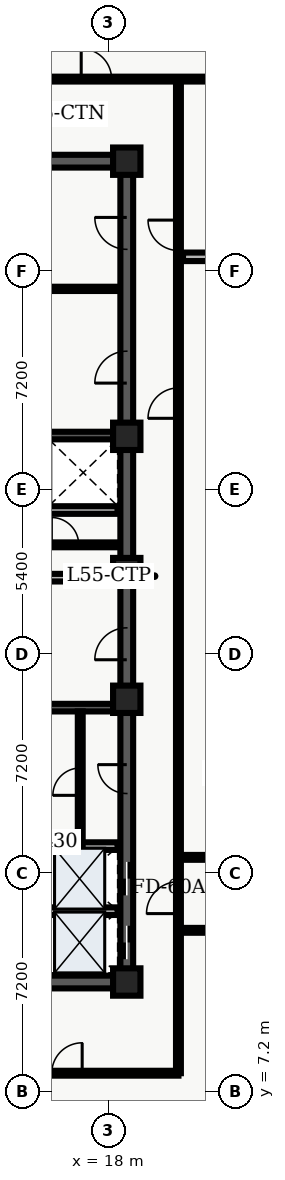
"""IFC4 building model, lengths in metres.
Left out: names, types, materials, properties, quantities, classifications, styles, units other than length and angle.
Written with IfcOpenShell. Run it as: python <this file> out.ifc"""

import sys

from ifc_helpers import new_model, entity, si_unit, converted_unit, direction, frame, origin_with_axes, origin_2d_with_axis, place, context, subcontext, project, spatial, polyline, rectangle, outline, extrude, element, fill, save


model = new_model("IFC4")
c1 = context("Model", 3, precision=1e-05, world=origin_with_axes(), true_north=direction((0.0, 1.0)))
c2 = subcontext(c1, "Body", "Model", "MODEL_VIEW")
j1 = project(units=[si_unit("LENGTHUNIT", "METRE"), converted_unit("PLANEANGLEUNIT", "DEGREE", entity("IfcPlaneAngleMeasure", 0.017), si_unit("PLANEANGLEUNIT", "RADIAN"), dimensions=[0, 0, 0, 0, 0, 0, 0])], contexts=[c1])
p1 = place(None, origin_with_axes())
s1 = spatial("IfcSite", under=j1, at=p1, CompositionType="ELEMENT")
p2 = place(p1, origin_with_axes())
s2 = spatial("IfcBuilding", under=s1, at=p2, CompositionType="ELEMENT")
p3 = place(p2, frame((0.0, 0.0, 224.7), z_axis=(0.0, 0.0, 1.0), x_axis=(1.0, 0.0, 0.0)))
s3 = spatial("IfcBuildingStorey", under=s2, at=p3, CompositionType="ELEMENT", Elevation=224.7)
p4 = place(p3, frame((11.4, 10.8, 0.0), z_axis=(0.0, 0.0, 1.0), x_axis=(1.0, 0.0, 0.0)))
e1 = element("IfcWall", 1, at=p4, inside=s3, PredefinedType="SHEAR", context=c2, shape_type="SweptSolid", body=[
    extrude(outline(polyline([(0.0, -0.21), (7.2, -0.21), (7.2, 0.21), (0.0, 0.21), (0.0, -0.21)])), origin_with_axes(), (0.0, 0.0, 1.0), 3.66),
])
p5 = place(p4, frame((2.625, 0.0, 0.0), z_axis=(0.0, 0.0, 1.0), x_axis=(1.0, 0.0, 0.0)))
e2 = element("IfcOpeningElement", 2, at=p5, cuts=e1, PredefinedType="OPENING", context=c2, shape_type="SweptSolid", body=[
    extrude(rectangle(XDim=1.05, YDim=0.44, at=origin_2d_with_axis()), origin_with_axes(), (0.0, 0.0, 1.0), 2.15),
])
p6 = place(p3, frame((11.4, 37.8, 0.0), z_axis=(0.0, 0.0, 1.0), x_axis=(1.0, 0.0, 0.0)))
e3 = element("IfcWall", 3, at=p6, inside=s3, PredefinedType="SHEAR", context=c2, shape_type="SweptSolid", body=[
    extrude(outline(polyline([(0.0, -0.21), (7.2, -0.21), (7.2, 0.21), (0.0, 0.21), (0.0, -0.21)])), origin_with_axes(), (0.0, 0.0, 1.0), 3.66),
])
p7 = place(p6, frame((2.625, 0.0, 0.0), z_axis=(0.0, 0.0, 1.0), x_axis=(1.0, 0.0, 0.0)))
e4 = element("IfcOpeningElement", 4, at=p7, cuts=e3, PredefinedType="OPENING", context=c2, shape_type="SweptSolid", body=[
    extrude(rectangle(XDim=1.05, YDim=0.44, at=origin_2d_with_axis()), origin_with_axes(), (0.0, 0.0, 1.0), 2.15),
])
p8 = place(p3, frame((18.6, 10.8, 0.0), z_axis=(0.0, 0.0, 1.0), x_axis=(0.0, 1.0, 0.0)))
e5 = element("IfcWall", 5, at=p8, inside=s3, PredefinedType="SHEAR", context=c2, shape_type="SweptSolid", body=[
    extrude(outline(polyline([(0.0, -0.21), (13.5, -0.21), (13.5, 0.21), (0.0, 0.21), (0.0, -0.21)])), origin_with_axes(), (0.0, 0.0, 1.0), 3.66),
])
p9 = place(p8, frame((1.3, 0.0, 0.0), z_axis=(0.0, 0.0, 1.0), x_axis=(1.0, 0.0, 0.0)))
e6 = element("IfcOpeningElement", 6, at=p9, cuts=e5, PredefinedType="OPENING", context=c2, shape_type="SweptSolid", body=[
    extrude(rectangle(XDim=1.1, YDim=0.44, at=origin_2d_with_axis()), origin_with_axes(), (0.0, 0.0, 1.0), 2.15),
])
p10 = place(p8, frame((3.4, 0.0, 0.0), z_axis=(0.0, 0.0, 1.0), x_axis=(1.0, 0.0, 0.0)))
e7 = element("IfcOpeningElement", 7, at=p10, cuts=e5, PredefinedType="OPENING", context=c2, shape_type="SweptSolid", body=[
    extrude(rectangle(XDim=1.1, YDim=0.44, at=origin_2d_with_axis()), origin_with_axes(), (0.0, 0.0, 1.0), 2.15),
])
p11 = place(p8, frame((11.125, 0.0, 0.0), z_axis=(0.0, 0.0, 1.0), x_axis=(1.0, 0.0, 0.0)))
e8 = element("IfcOpeningElement", 8, at=p11, cuts=e5, PredefinedType="OPENING", context=c2, shape_type="SweptSolid", body=[
    extrude(rectangle(XDim=1.05, YDim=0.44, at=origin_2d_with_axis()), origin_with_axes(), (0.0, 0.0, 1.0), 2.15),
])
p12 = place(p8, frame((6.675, 0.0, 0.0), z_axis=(0.0, 0.0, 1.0), x_axis=(1.0, 0.0, 0.0)))
e9 = element("IfcOpeningElement", 9, at=p12, cuts=e5, PredefinedType="OPENING", context=c2, shape_type="SweptSolid", body=[
    extrude(rectangle(XDim=0.95, YDim=0.44, at=origin_2d_with_axis()), origin_with_axes(), (0.0, 0.0, 1.0), 2.15),
])
p13 = place(p3, frame((18.6, 24.3, 0.0), z_axis=(0.0, 0.0, 1.0), x_axis=(0.0, 1.0, 0.0)))
e10 = element("IfcWall", 10, at=p13, inside=s3, PredefinedType="SHEAR", context=c2, shape_type="SweptSolid", body=[
    extrude(outline(polyline([(0.0, -0.21), (13.5, -0.21), (13.5, 0.21), (0.0, 0.21), (0.0, -0.21)])), origin_with_axes(), (0.0, 0.0, 1.0), 3.66),
])
p14 = place(p13, frame((6.725, 0.0, 0.0), z_axis=(0.0, 0.0, 1.0), x_axis=(1.0, 0.0, 0.0)))
e11 = element("IfcOpeningElement", 11, at=p14, cuts=e10, PredefinedType="OPENING", context=c2, shape_type="SweptSolid", body=[
    extrude(rectangle(XDim=1.05, YDim=0.44, at=origin_2d_with_axis()), origin_with_axes(), (0.0, 0.0, 1.0), 2.15),
])
p15 = place(p13, frame((11.125, 0.0, 0.0), z_axis=(0.0, 0.0, 1.0), x_axis=(1.0, 0.0, 0.0)))
e12 = element("IfcOpeningElement", 12, at=p15, cuts=e10, PredefinedType="OPENING", context=c2, shape_type="SweptSolid", body=[
    extrude(rectangle(XDim=1.05, YDim=0.44, at=origin_2d_with_axis()), origin_with_axes(), (0.0, 0.0, 1.0), 2.15),
])
for number, where, z_axis, x_axis in (
    (13, (11.61, 19.825, 0.0), (0.0, 0.0, 1.0), (1.0, 0.0, 0.0)),
    (14, (11.61, 28.775, 0.0), (0.0, 0.0, 1.0), (1.0, 0.0, 0.0)),
):
    element("IfcWall", number, at=place(p3, frame(where, z_axis=z_axis, x_axis=x_axis)), inside=s3, PredefinedType="SHEAR", context=c2, shape_type="SweptSolid", body=[
        extrude(outline(polyline([(0.0, -0.125), (6.78, -0.125), (6.78, 0.125), (0.0, 0.125), (0.0, -0.125)])), origin_with_axes(), (0.0, 0.0, 1.0), 3.66),
    ])
p16 = place(p3, frame((11.7, 24.1, 0.0), z_axis=(0.0, 0.0, 1.0), x_axis=(1.0, 0.0, 0.0)))
e15 = element("IfcWall", 15, at=p16, inside=s3, PredefinedType="SOLIDWALL", context=c2, shape_type="SweptSolid", body=[
    extrude(outline(polyline([(0.0, -0.125), (6.6, -0.125), (6.6, 0.125), (0.0, 0.125), (0.0, -0.125)])), origin_with_axes(), (0.0, 0.0, 1.0), 2.7),
])
p17 = place(p16, frame((3.75, 0.0, 0.0), z_axis=(0.0, 0.0, 1.0), x_axis=(1.0, 0.0, 0.0)))
e16 = element("IfcOpeningElement", 16, at=p17, cuts=e15, PredefinedType="OPENING", context=c2, shape_type="SweptSolid", body=[
    extrude(rectangle(XDim=0.9, YDim=0.27, at=origin_2d_with_axis()), origin_with_axes(), (0.0, 0.0, 1.0), 2.15),
])
p18 = place(p3, frame((11.7, 26.325, 0.0), z_axis=(0.0, 0.0, 1.0), x_axis=(1.0, 0.0, 0.0)))
e17 = element("IfcWall", 17, at=p18, inside=s3, PredefinedType="SOLIDWALL", context=c2, shape_type="SweptSolid", body=[
    extrude(outline(polyline([(0.0, -0.125), (6.6, -0.125), (6.6, 0.125), (0.0, 0.125), (0.0, -0.125)])), origin_with_axes(), (0.0, 0.0, 1.0), 2.7),
])
p19 = place(p18, frame((3.5, 0.0, 0.0), z_axis=(0.0, 0.0, 1.0), x_axis=(1.0, 0.0, 0.0)))
e18 = element("IfcOpeningElement", 18, at=p19, cuts=e17, PredefinedType="OPENING", context=c2, shape_type="SweptSolid", body=[
    extrude(rectangle(XDim=0.9, YDim=0.27, at=origin_2d_with_axis()), origin_with_axes(), (0.0, 0.0, 1.0), 2.15),
])
for number, where, z_axis, x_axis in (
    (19, (18.6, 10.8, 0.0), (0.0, 0.0, 1.0), (1.0, 0.0, 0.0)),
    (20, (18.6, 20.1, 0.0), (0.0, 0.0, 1.0), (1.0, 0.0, 0.0)),
    (21, (18.6, 24.3, 0.0), (0.0, 0.0, 1.0), (1.0, 0.0, 0.0)),
    (22, (18.6, 28.75, 0.0), (0.0, 0.0, 1.0), (1.0, 0.0, 0.0)),
    (23, (18.6, 37.8, 0.0), (0.0, 0.0, 1.0), (1.0, 0.0, 0.0)),
):
    element("IfcColumn", number, at=place(p3, frame(where, z_axis=z_axis, x_axis=x_axis)), inside=s3, PredefinedType="COLUMN", context=c2, shape_type="SweptSolid", body=[
        extrude(rectangle(XDim=0.9, YDim=0.9, at=origin_2d_with_axis()), origin_with_axes(), (0.0, 0.0, 1.0), 3.9),
    ])
p20 = place(p3, frame((14.62, 25.18, 0.0), z_axis=(0.0, 0.0, 1.0), x_axis=(1.0, 0.0, 0.0)))
e24 = element("IfcWall", 24, at=p20, inside=s3, PredefinedType="PARTITIONING", context=c2, shape_type="SweptSolid", body=[
    extrude(outline(polyline([(0.0, -0.08), (3.68, -0.08), (3.68, 0.08), (0.0, 0.08), (0.0, -0.08)])), origin_with_axes(), (0.0, 0.0, 1.0), 2.7),
])
p21 = place(p20, frame((1.95, 0.0, 0.0), z_axis=(0.0, 0.0, 1.0), x_axis=(1.0, 0.0, 0.0)))
e25 = element("IfcOpeningElement", 25, at=p21, cuts=e24, PredefinedType="OPENING", context=c2, shape_type="SweptSolid", body=[
    extrude(rectangle(XDim=0.9, YDim=0.18, at=origin_2d_with_axis()), origin_with_axes(), (0.0, 0.0, 1.0), 2.15),
])
for number, where, z_axis, x_axis in (
    (26, (15.84, 13.13, 0.0), (0.0, 0.0, 1.0), (1.0, 0.0, 0.0)),
    (27, (15.84, 15.27, 0.0), (0.0, 0.0, 1.0), (1.0, 0.0, 0.0)),
):
    element("IfcWall", number, at=place(p3, frame(where, z_axis=z_axis, x_axis=x_axis)), inside=s3, PredefinedType="SOLIDWALL", context=c2, shape_type="SweptSolid", body=[
        extrude(outline(polyline([(0.0, -0.125), (2.46, -0.125), (2.46, 0.125), (0.0, 0.125), (0.0, -0.125)])), origin_with_axes(), (0.0, 0.0, 1.0), 2.7),
    ])
p22 = place(p3, frame((17.07, 15.34, 0.0), z_axis=(0.0, 0.0, 1.0), x_axis=(0.0, 1.0, 0.0)))
e28 = element("IfcWall", 28, at=p22, inside=s3, PredefinedType="PARTITIONING", context=c2, shape_type="SweptSolid", body=[
    extrude(outline(polyline([(0.0, -0.08), (4.36, -0.08), (4.36, 0.08), (0.0, 0.08), (0.0, -0.08)])), origin_with_axes(), (0.0, 0.0, 1.0), 2.7),
])
p23 = place(p22, frame((2.05, 0.0, 0.0), z_axis=(0.0, 0.0, 1.0), x_axis=(1.0, 0.0, 0.0)))
e29 = element("IfcOpeningElement", 29, at=p23, cuts=e28, PredefinedType="OPENING", context=c2, shape_type="SweptSolid", body=[
    extrude(rectangle(XDim=0.9, YDim=0.18, at=origin_2d_with_axis()), origin_with_axes(), (0.0, 0.0, 1.0), 2.15),
])
p24 = place(p3, frame((15.84, 33.6, 0.0), z_axis=(0.0, 0.0, 1.0), x_axis=(1.0, 0.0, 0.0)))
e30 = element("IfcWall", 30, at=p24, inside=s3, PredefinedType="PARTITIONING", context=c2, shape_type="SweptSolid", body=[
    extrude(outline(polyline([(0.0, -0.07), (2.46, -0.07), (2.46, 0.07), (0.0, 0.07), (0.0, -0.07)])), origin_with_axes(), (0.0, 0.0, 1.0), 2.7),
])
p25 = place(p3, frame((7.1, 7.8, 0.0), z_axis=(0.0, 0.0, 1.0), x_axis=(1.0, 0.0, 0.0)))
e31 = element("IfcWall", 31, at=p25, inside=s3, PredefinedType="PARTITIONING", context=c2, shape_type="SweptSolid", body=[
    extrude(outline(polyline([(0.0, -0.08), (13.2, -0.08), (13.2, 0.08), (0.0, 0.08), (0.0, -0.08)])), origin_with_axes(), (0.0, 0.0, 1.0), 2.7),
])
p26 = place(p25, frame((2.954, 0.0, 0.0), z_axis=(0.0, 0.0, 1.0), x_axis=(1.0, 0.0, 0.0)))
e32 = element("IfcOpeningElement", 32, at=p26, cuts=e31, PredefinedType="OPENING", context=c2, shape_type="SweptSolid", body=[
    extrude(rectangle(XDim=1.0, YDim=0.18, at=origin_2d_with_axis()), origin_with_axes(), (0.0, 0.0, 1.0), 2.15),
])
p27 = place(p25, frame((9.534, 0.0, 0.0), z_axis=(0.0, 0.0, 1.0), x_axis=(1.0, 0.0, 0.0)))
e33 = element("IfcOpeningElement", 33, at=p27, cuts=e31, PredefinedType="OPENING", context=c2, shape_type="SweptSolid", body=[
    extrude(rectangle(XDim=1.0, YDim=0.18, at=origin_2d_with_axis()), origin_with_axes(), (0.0, 0.0, 1.0), 2.15),
])
p28 = place(p3, frame((7.1, 40.5, 0.0), z_axis=(0.0, 0.0, 1.0), x_axis=(1.0, 0.0, 0.0)))
e34 = element("IfcWall", 34, at=p28, inside=s3, PredefinedType="PARTITIONING", context=c2, shape_type="SweptSolid", body=[
    extrude(outline(polyline([(0.0, -0.08), (24.965, -0.08), (24.965, 0.08), (0.0, 0.08), (0.0, -0.08)])), origin_with_axes(), (0.0, 0.0, 1.0), 2.7),
])
p29 = place(p28, frame((3.093, 0.0, 0.0), z_axis=(0.0, 0.0, 1.0), x_axis=(1.0, 0.0, 0.0)))
e35 = element("IfcOpeningElement", 35, at=p29, cuts=e34, PredefinedType="OPENING", context=c2, shape_type="SweptSolid", body=[
    extrude(rectangle(XDim=1.0, YDim=0.18, at=origin_2d_with_axis()), origin_with_axes(), (0.0, 0.0, 1.0), 2.15),
])
p30 = place(p28, frame((5.873, 0.0, 0.0), z_axis=(0.0, 0.0, 1.0), x_axis=(1.0, 0.0, 0.0)))
e36 = element("IfcOpeningElement", 36, at=p30, cuts=e34, PredefinedType="OPENING", context=c2, shape_type="SweptSolid", body=[
    extrude(rectangle(XDim=1.0, YDim=0.18, at=origin_2d_with_axis()), origin_with_axes(), (0.0, 0.0, 1.0), 2.15),
])
p31 = place(p28, frame((10.502, 0.0, 0.0), z_axis=(0.0, 0.0, 1.0), x_axis=(1.0, 0.0, 0.0)))
e37 = element("IfcOpeningElement", 37, at=p31, cuts=e34, PredefinedType="OPENING", context=c2, shape_type="SweptSolid", body=[
    extrude(rectangle(XDim=1.0, YDim=0.18, at=origin_2d_with_axis()), origin_with_axes(), (0.0, 0.0, 1.0), 2.15),
])
p32 = place(p3, frame((20.3, 7.8, 0.0), z_axis=(0.0, 0.0, 1.0), x_axis=(0.0, 1.0, 0.0)))
e38 = element("IfcWall", 38, at=p32, inside=s3, PredefinedType="PARTITIONING", context=c2, shape_type="SweptSolid", body=[
    extrude(outline(polyline([(0.0, -0.08), (32.7, -0.08), (32.7, 0.08), (0.0, 0.08), (0.0, -0.08)])), origin_with_axes(), (0.0, 0.0, 1.0), 2.7),
])
p33 = place(p32, frame((22.042, 0.0, 0.0), z_axis=(0.0, 0.0, 1.0), x_axis=(1.0, 0.0, 0.0)))
e39 = element("IfcOpeningElement", 39, at=p33, cuts=e38, PredefinedType="OPENING", context=c2, shape_type="SweptSolid", body=[
    extrude(rectangle(XDim=1.0, YDim=0.18, at=origin_2d_with_axis()), origin_with_axes(), (0.0, 0.0, 1.0), 2.15),
])
p34 = place(p32, frame((27.562, 0.0, 0.0), z_axis=(0.0, 0.0, 1.0), x_axis=(1.0, 0.0, 0.0)))
e40 = element("IfcOpeningElement", 40, at=p34, cuts=e38, PredefinedType="OPENING", context=c2, shape_type="SweptSolid", body=[
    extrude(rectangle(XDim=1.0, YDim=0.18, at=origin_2d_with_axis()), origin_with_axes(), (0.0, 0.0, 1.0), 2.15),
])
p35 = place(p32, frame((5.775, 0.0, 0.0), z_axis=(0.0, 0.0, 1.0), x_axis=(1.0, 0.0, 0.0)))
e41 = element("IfcOpeningElement", 41, at=p35, cuts=e38, PredefinedType="OPENING", context=c2, shape_type="SweptSolid", body=[
    extrude(rectangle(XDim=1.05, YDim=0.18, at=origin_2d_with_axis()), origin_with_axes(), (0.0, 0.0, 1.0), 2.15),
])
p36 = place(p3, frame((20.45, 34.654, 0.0), z_axis=(0.0, 0.0, 1.0), x_axis=(1.0, 0.0, 0.0)))
e42 = element("IfcWall", 42, at=p36, inside=s3, PredefinedType="PARTITIONING", context=c2, shape_type="SweptSolid", body=[
    extrude(outline(polyline([(0.0, -0.14), (11.615, -0.14), (11.615, 0.14), (0.0, 0.14), (0.0, -0.14)])), origin_with_axes(), (0.0, 0.0, 1.0), 2.7),
])
p37 = place(p3, frame((20.3, 12.5, 0.0), z_axis=(0.0, 0.0, 1.0), x_axis=(1.0, 0.0, 0.0)))
e43 = element("IfcWall", 43, at=p37, inside=s3, PredefinedType="PARTITIONING", context=c2, shape_type="SweptSolid", body=[
    extrude(outline(polyline([(0.0, -0.08), (16.05, -0.08), (16.05, 0.08), (0.0, 0.08), (0.0, -0.08)])), origin_with_axes(), (0.0, 0.0, 1.0), 2.7),
])
p38 = place(p37, frame((3.677, 0.0, 0.0), z_axis=(0.0, 0.0, 1.0), x_axis=(1.0, 0.0, 0.0)))
e44 = element("IfcOpeningElement", 44, at=p38, cuts=e43, PredefinedType="OPENING", context=c2, shape_type="SweptSolid", body=[
    extrude(rectangle(XDim=1.0, YDim=0.18, at=origin_2d_with_axis()), origin_with_axes(), (0.0, 0.0, 1.0), 2.15),
])
p39 = place(p37, frame((11.572, 0.0, 0.0), z_axis=(0.0, 0.0, 1.0), x_axis=(1.0, 0.0, 0.0)))
e45 = element("IfcOpeningElement", 45, at=p39, cuts=e43, PredefinedType="OPENING", context=c2, shape_type="SweptSolid", body=[
    extrude(rectangle(XDim=1.0, YDim=0.18, at=origin_2d_with_axis()), origin_with_axes(), (0.0, 0.0, 1.0), 2.15),
])
p40 = place(p3, frame((20.3, 14.9, 0.0), z_axis=(0.0, 0.0, 1.0), x_axis=(1.0, 0.0, 0.0)))
e46 = element("IfcWall", 46, at=p40, inside=s3, PredefinedType="PARTITIONING", context=c2, shape_type="SweptSolid", body=[
    extrude(outline(polyline([(0.0, -0.08), (16.05, -0.08), (16.05, 0.08), (0.0, 0.08), (0.0, -0.08)])), origin_with_axes(), (0.0, 0.0, 1.0), 2.7),
])
p41 = place(p40, frame((3.877, 0.0, 0.0), z_axis=(0.0, 0.0, 1.0), x_axis=(1.0, 0.0, 0.0)))
e47 = element("IfcOpeningElement", 47, at=p41, cuts=e46, PredefinedType="OPENING", context=c2, shape_type="SweptSolid", body=[
    extrude(rectangle(XDim=1.0, YDim=0.18, at=origin_2d_with_axis()), origin_with_axes(), (0.0, 0.0, 1.0), 2.15),
])
p42 = place(p40, frame((9.511, 0.0, 0.0), z_axis=(0.0, 0.0, 1.0), x_axis=(1.0, 0.0, 0.0)))
e48 = element("IfcOpeningElement", 48, at=p42, cuts=e46, PredefinedType="OPENING", context=c2, shape_type="SweptSolid", body=[
    extrude(rectangle(XDim=1.0, YDim=0.18, at=origin_2d_with_axis()), origin_with_axes(), (0.0, 0.0, 1.0), 2.15),
])
p43 = place(p40, frame((13.709, 0.0, 0.0), z_axis=(0.0, 0.0, 1.0), x_axis=(1.0, 0.0, 0.0)))
e49 = element("IfcOpeningElement", 49, at=p43, cuts=e46, PredefinedType="OPENING", context=c2, shape_type="SweptSolid", body=[
    extrude(rectangle(XDim=1.0, YDim=0.18, at=origin_2d_with_axis()), origin_with_axes(), (0.0, 0.0, 1.0), 2.15),
])
p44 = place(p8, frame((1.3, 0.0, 0.0), z_axis=(0.0, 0.0, 1.0), x_axis=(1.0, 0.0, 0.0)))
e50 = element("IfcDoor", 50, at=p44, inside=s3, OperationType="SLIDING_TO_LEFT", PredefinedType="DOOR", context=c2, shape_type="SweptSolid", body=[
    extrude(rectangle(XDim=1.1, YDim=0.09, at=origin_2d_with_axis()), origin_with_axes(), (0.0, 0.0, 1.0), 2.15),
])
fill(e6, e50)
p45 = place(p8, frame((3.4, 0.0, 0.0), z_axis=(0.0, 0.0, 1.0), x_axis=(1.0, 0.0, 0.0)))
e51 = element("IfcDoor", 51, at=p45, inside=s3, OperationType="SLIDING_TO_RIGHT", PredefinedType="DOOR", context=c2, shape_type="SweptSolid", body=[
    extrude(rectangle(XDim=1.1, YDim=0.09, at=origin_2d_with_axis()), origin_with_axes(), (0.0, 0.0, 1.0), 2.15),
])
fill(e7, e51)
p46 = place(p8, frame((11.125, 0.0, 0.0), z_axis=(0.0, 0.0, 1.0), x_axis=(1.0, 0.0, 0.0)))
e52 = element("IfcDoor", 52, at=p46, inside=s3, OperationType="SINGLE_SWING_LEFT", PredefinedType="DOOR", context=c2, shape_type="SweptSolid", body=[
    extrude(rectangle(XDim=1.05, YDim=0.09, at=origin_2d_with_axis()), origin_with_axes(), (0.0, 0.0, 1.0), 2.15),
])
fill(e8, e52)
p47 = place(p20, frame((1.95, 0.0, 0.0), z_axis=(0.0, 0.0, 1.0), x_axis=(1.0, 0.0, 0.0)))
e53 = element("IfcDoor", 53, at=p47, inside=s3, OperationType="SINGLE_SWING_LEFT", PredefinedType="DOOR", context=c2, shape_type="SweptSolid", body=[
    extrude(rectangle(XDim=0.9, YDim=0.09, at=origin_2d_with_axis()), origin_with_axes(), (0.0, 0.0, 1.0), 2.15),
])
fill(e25, e53)
p48 = place(p22, frame((2.05, 0.0, 0.0), z_axis=(0.0, 0.0, 1.0), x_axis=(1.0, 0.0, 0.0)))
e54 = element("IfcDoor", 54, at=p48, inside=s3, OperationType="SINGLE_SWING_LEFT", PredefinedType="DOOR", context=c2, shape_type="SweptSolid", body=[
    extrude(rectangle(XDim=0.9, YDim=0.09, at=origin_2d_with_axis()), origin_with_axes(), (0.0, 0.0, 1.0), 2.15),
])
fill(e29, e54)
p49 = place(p8, frame((6.675, 0.0, 0.0), z_axis=(0.0, 0.0, 1.0), x_axis=(1.0, 0.0, 0.0)))
e55 = element("IfcDoor", 55, at=p49, inside=s3, OperationType="SINGLE_SWING_RIGHT", PredefinedType="DOOR", context=c2, shape_type="SweptSolid", body=[
    extrude(rectangle(XDim=0.95, YDim=0.09, at=origin_2d_with_axis()), origin_with_axes(), (0.0, 0.0, 1.0), 2.15),
])
fill(e9, e55)
p50 = place(p13, frame((6.725, 0.0, 0.0), z_axis=(0.0, 0.0, 1.0), x_axis=(1.0, 0.0, 0.0)))
e56 = element("IfcDoor", 56, at=p50, inside=s3, OperationType="SINGLE_SWING_LEFT", PredefinedType="DOOR", context=c2, shape_type="SweptSolid", body=[
    extrude(rectangle(XDim=1.05, YDim=0.09, at=origin_2d_with_axis()), origin_with_axes(), (0.0, 0.0, 1.0), 2.15),
])
fill(e11, e56)
p51 = place(p13, frame((11.125, 0.0, 0.0), z_axis=(0.0, 0.0, 1.0), x_axis=(1.0, 0.0, 0.0)))
e57 = element("IfcDoor", 57, at=p51, inside=s3, OperationType="SINGLE_SWING_RIGHT", PredefinedType="DOOR", context=c2, shape_type="SweptSolid", body=[
    extrude(rectangle(XDim=1.05, YDim=0.09, at=origin_2d_with_axis()), origin_with_axes(), (0.0, 0.0, 1.0), 2.15),
])
fill(e12, e57)
p52 = place(p25, frame((9.534, 0.0, 0.0), z_axis=(0.0, 0.0, 1.0), x_axis=(1.0, 0.0, 0.0)))
e58 = element("IfcDoor", 58, at=p52, inside=s3, OperationType="SINGLE_SWING_RIGHT", PredefinedType="DOOR", context=c2, shape_type="SweptSolid", body=[
    extrude(rectangle(XDim=1.0, YDim=0.09, at=origin_2d_with_axis()), origin_with_axes(), (0.0, 0.0, 1.0), 2.15),
])
fill(e33, e58)
p53 = place(p28, frame((10.502, 0.0, 0.0), z_axis=(0.0, 0.0, 1.0), x_axis=(1.0, 0.0, 0.0)))
e59 = element("IfcDoor", 59, at=p53, inside=s3, OperationType="SINGLE_SWING_LEFT", PredefinedType="DOOR", context=c2, shape_type="SweptSolid", body=[
    extrude(rectangle(XDim=1.0, YDim=0.09, at=origin_2d_with_axis()), origin_with_axes(), (0.0, 0.0, 1.0), 2.15),
])
fill(e37, e59)
p54 = place(p32, frame((22.042, 0.0, 0.0), z_axis=(0.0, 0.0, 1.0), x_axis=(1.0, 0.0, 0.0)))
e60 = element("IfcDoor", 60, at=p54, inside=s3, OperationType="SINGLE_SWING_LEFT", PredefinedType="DOOR", context=c2, shape_type="SweptSolid", body=[
    extrude(rectangle(XDim=1.0, YDim=0.09, at=origin_2d_with_axis()), origin_with_axes(), (0.0, 0.0, 1.0), 2.15),
])
fill(e39, e60)
p55 = place(p32, frame((27.562, 0.0, 0.0), z_axis=(0.0, 0.0, 1.0), x_axis=(1.0, 0.0, 0.0)))
e61 = element("IfcDoor", 61, at=p55, inside=s3, OperationType="SINGLE_SWING_RIGHT", PredefinedType="DOOR", context=c2, shape_type="SweptSolid", body=[
    extrude(rectangle(XDim=1.0, YDim=0.09, at=origin_2d_with_axis()), origin_with_axes(), (0.0, 0.0, 1.0), 2.15),
])
fill(e40, e61)
p56 = place(p32, frame((5.775, 0.0, 0.0), z_axis=(0.0, 0.0, 1.0), x_axis=(1.0, 0.0, 0.0)))
e62 = element("IfcDoor", 62, at=p56, inside=s3, OperationType="SINGLE_SWING_LEFT", PredefinedType="DOOR", context=c2, shape_type="SweptSolid", body=[
    extrude(rectangle(XDim=1.05, YDim=0.09, at=origin_2d_with_axis()), origin_with_axes(), (0.0, 0.0, 1.0), 2.15),
])
fill(e41, e62)
save(model, sys.argv[1])
